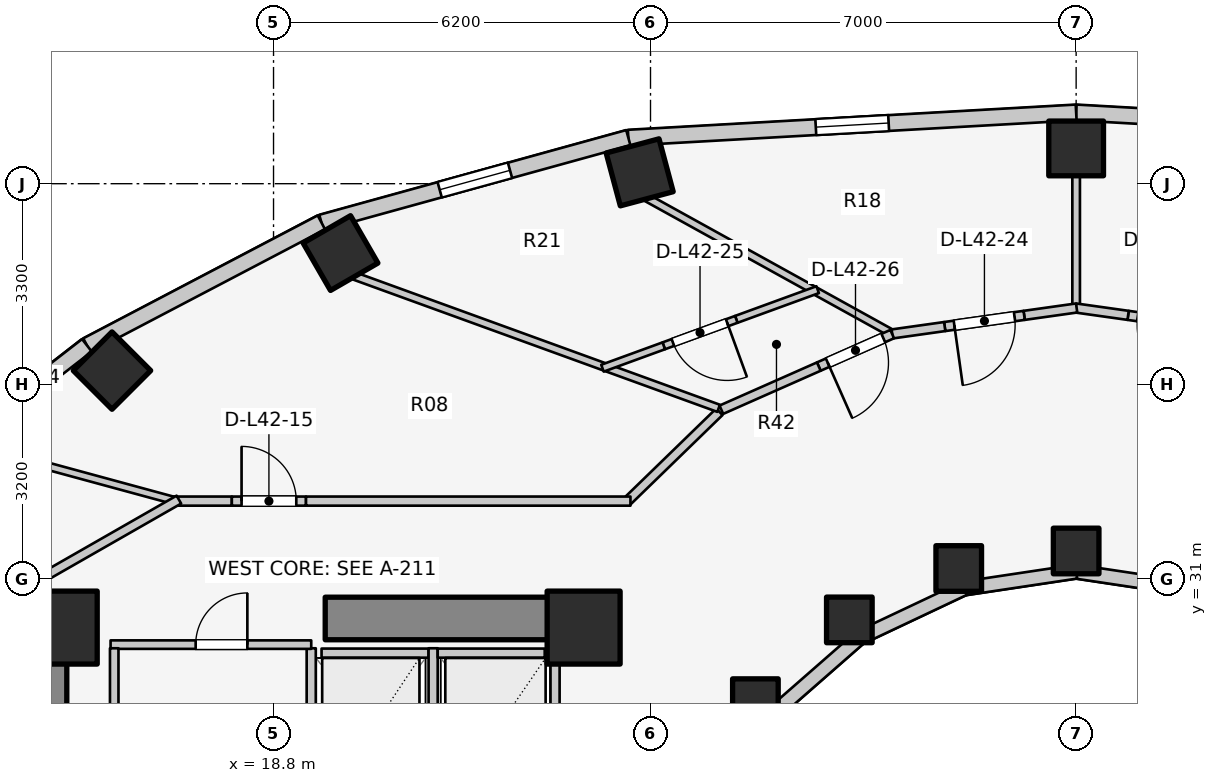
"""IFC4 building model, lengths in metres.
Left out: names, types, materials, properties, quantities, classifications, styles, units other than length and angle.
Written with IfcOpenShell. Run it as: python <this file> out.ifc"""

import sys

from ifc_helpers import new_model, si_unit, direction, frame, frame_2d, origin, origin_2d, place, context, subcontext, project, spatial, rectangle, extrude, element, fill, save


model = new_model("IFC4")
c1 = context("Model", 3, precision=1e-05, world=origin(), true_north=direction((0.0, 1.0)))
c2 = subcontext(c1, "Body", "Model", "MODEL_VIEW")
j1 = project(units=[si_unit("LENGTHUNIT", "METRE"), si_unit("PLANEANGLEUNIT", "RADIAN")], contexts=[c1])
p1 = place(None, origin())
s1 = spatial("IfcSite", under=j1, at=p1, CompositionType="ELEMENT")
p2 = place(p1, origin())
s2 = spatial("IfcBuilding", under=s1, at=p2, CompositionType="ELEMENT")
p3 = place(p2, frame((0.0, 0.0, 140.5)))
s3 = spatial("IfcBuildingStorey", under=s2, at=p3, CompositionType="ELEMENT", Elevation=140.5)
p4 = place(p3, frame((15.05, 17.05, 0.0), z_axis=(0.0, 0.0, 1.0), x_axis=(0.0, 1.0, 0.0)))
e1 = element("IfcWall", 1, at=p4, inside=s3, PredefinedType="SHEAR", context=c2, shape_type="SweptSolid", body=[
    extrude(rectangle(XDim=12.8, YDim=0.7, at=frame_2d((6.4, 0.0))), origin(), (0.0, 0.0, 1.0), 3.1),
])
p5 = place(p3, frame((19.65, 30.35, 0.0), z_axis=(0.0, 0.0, 1.0), x_axis=(1.0, 0.0, 0.0)))
e2 = element("IfcWall", 2, at=p5, inside=s3, PredefinedType="SHEAR", context=c2, shape_type="SweptSolid", body=[
    extrude(rectangle(XDim=4.5, YDim=0.7, at=frame_2d((2.25, 0.0))), origin(), (0.0, 0.0, 1.0), 3.1),
])
for number, where, z_axis, x_axis in (
    (3, (23.9, 30.2, 0.0), (0.0, 0.0, 1.0), (1.0, 0.0, 0.0)),
    (4, (15.3, 30.2, 0.0), (0.0, 0.0, 1.0), (1.0, 0.0, 0.0)),
):
    element("IfcColumn", number, at=place(p3, frame(where, z_axis=z_axis, x_axis=x_axis)), inside=s3, PredefinedType="COLUMN", context=c2, shape_type="SweptSolid", body=[
        extrude(rectangle(XDim=1.2, YDim=1.2, at=origin_2d()), origin(), (0.0, 0.0, 1.0), 3.1),
    ])
p6 = place(p3, frame((32.0, 31.46, 0.0), z_axis=(0.0, 0.0, 1.0), x_axis=(1.0, 0.0, 0.0)))
e5 = element("IfcColumn", 5, at=p6, inside=s3, PredefinedType="COLUMN", context=c2, shape_type="SweptSolid", body=[
    extrude(rectangle(XDim=0.75, YDim=0.75, at=origin_2d()), origin(), (0.0, 0.0, 1.0), 3.1),
])
p7 = place(p3, frame((32.0, 38.08, 0.0), z_axis=(0.0, 0.0, 1.0), x_axis=(0.0, 1.0, 0.0)))
e6 = element("IfcColumn", 6, at=p7, inside=s3, PredefinedType="COLUMN", context=c2, shape_type="SweptSolid", body=[
    extrude(rectangle(XDim=0.9, YDim=0.9, at=origin_2d()), origin(), (0.0, 0.0, 1.0), 3.1),
])
p8 = place(p3, frame((30.069, 31.172, 0.0), z_axis=(0.0, 0.0, 1.0), x_axis=(1.0, 0.0, 0.0)))
e7 = element("IfcColumn", 7, at=p8, inside=s3, PredefinedType="COLUMN", context=c2, shape_type="SweptSolid", body=[
    extrude(rectangle(XDim=0.75, YDim=0.75, at=origin_2d()), origin(), (0.0, 0.0, 1.0), 3.1),
])
p9 = place(p3, frame((24.822, 37.687, 0.0), z_axis=(0.0, 0.0, 1.0), x_axis=(-0.258819045103, 0.965925826289, 0.0)))
e8 = element("IfcColumn", 8, at=p9, inside=s3, PredefinedType="COLUMN", context=c2, shape_type="SweptSolid", body=[
    extrude(rectangle(XDim=0.9, YDim=0.9, at=origin_2d()), origin(), (0.0, 0.0, 1.0), 3.1),
])
p10 = place(p3, frame((28.27, 30.327, 0.0), z_axis=(0.0, 0.0, 1.0), x_axis=(1.0, 0.0, 0.0)))
e9 = element("IfcColumn", 9, at=p10, inside=s3, PredefinedType="COLUMN", context=c2, shape_type="SweptSolid", body=[
    extrude(rectangle(XDim=0.75, YDim=0.75, at=origin_2d()), origin(), (0.0, 0.0, 1.0), 3.1),
])
p11 = place(p3, frame((19.902, 36.359, 0.0), z_axis=(0.0, 0.0, 1.0), x_axis=(-0.5, 0.866025403784, 0.0)))
e10 = element("IfcColumn", 10, at=p11, inside=s3, PredefinedType="COLUMN", context=c2, shape_type="SweptSolid", body=[
    extrude(rectangle(XDim=0.9, YDim=0.9, at=origin_2d()), origin(), (0.0, 0.0, 1.0), 3.1),
])
p12 = place(p3, frame((26.725, 28.982, 0.0), z_axis=(0.0, 0.0, 1.0), x_axis=(1.0, 0.0, 0.0)))
e11 = element("IfcColumn", 11, at=p12, inside=s3, PredefinedType="COLUMN", context=c2, shape_type="SweptSolid", body=[
    extrude(rectangle(XDim=0.75, YDim=0.75, at=origin_2d()), origin(), (0.0, 0.0, 1.0), 3.1),
])
p13 = place(p3, frame((16.143, 34.427, 0.0), z_axis=(0.0, 0.0, 1.0), x_axis=(-0.707106781187, 0.707106781187, 0.0)))
e12 = element("IfcColumn", 12, at=p13, inside=s3, PredefinedType="COLUMN", context=c2, shape_type="SweptSolid", body=[
    extrude(rectangle(XDim=0.9, YDim=0.9, at=origin_2d()), origin(), (0.0, 0.0, 1.0), 3.1),
])
for number, where, z_axis, x_axis in (
    (13, (33.843, 30.843, 0.0), (0.0, 0.0, 1.0), (-0.989, 0.149, 0.0)),
    (14, (32.0, 31.12, 0.0), (0.0, 0.0, 1.0), (-0.989, -0.149, 0.0)),
):
    element("IfcWall", number, at=place(p3, frame(where, z_axis=z_axis, x_axis=x_axis)), inside=s3, PredefinedType="STANDARD", context=c2, shape_type="SweptSolid", body=[
        extrude(rectangle(XDim=1.864, YDim=0.23, at=frame_2d((0.932, 0.0))), origin(), (0.0, 0.0, 1.0), 1.22),
    ])
p14 = place(p3, frame((30.157, 30.843, 0.0), z_axis=(0.0, 0.0, 1.0), x_axis=(-0.904179699603, -0.427152280606, 0.0)))
e15 = element("IfcWall", 15, at=p14, inside=s3, PredefinedType="STANDARD", context=c2, shape_type="SweptSolid", body=[
    extrude(rectangle(XDim=1.899, YDim=0.23, at=frame_2d((0.95, 0.0))), origin(), (0.0, 0.0, 1.0), 1.22),
])
p15 = place(p3, frame((28.44, 30.032, 0.0), z_axis=(0.0, 0.0, 1.0), x_axis=(-0.752576694707, -0.658504607869, 0.0)))
e16 = element("IfcWall", 16, at=p15, inside=s3, PredefinedType="STANDARD", context=c2, shape_type="SweptSolid", body=[
    extrude(rectangle(XDim=1.959, YDim=0.23, at=frame_2d((0.98, 0.0))), origin(), (0.0, 0.0, 1.0), 1.22),
])
p16 = place(p3, frame((39.365, 38.257, 0.0), z_axis=(0.0, 0.0, 1.0), x_axis=(-0.998417906562, 0.056228852534, 0.0)))
e17 = element("IfcWall", 17, at=p16, inside=s3, PredefinedType="STANDARD", context=c2, shape_type="SweptSolid", body=[
    extrude(rectangle(XDim=7.377, YDim=0.26, at=frame_2d((3.688, 0.0))), origin(), (0.0, 0.0, 1.0), 1.22),
])
p17 = place(p16, frame((3.088, 0.0, 0.15)))
e18 = element("IfcOpeningElement", 18, at=p17, cuts=e17, PredefinedType="OPENING", context=c2, shape_type="SweptSolid", body=[
    extrude(rectangle(XDim=1.2, YDim=0.9, at=frame_2d((0.6, 0.45))), frame((0.0, 0.14, 0.0), z_axis=(0.0, -1.0, 0.0), x_axis=(1.0, 0.0, 0.0)), (0.0, 0.0, 1.0), 0.28),
])
p18 = place(p3, frame((32.0, 38.671, 0.0), z_axis=(0.0, 0.0, 1.0), x_axis=(-0.998417906562, -0.056228852534, 0.0)))
e19 = element("IfcWall", 19, at=p18, inside=s3, PredefinedType="STANDARD", context=c2, shape_type="SweptSolid", body=[
    extrude(rectangle(XDim=7.377, YDim=0.26, at=frame_2d((3.688, 0.0))), origin(), (0.0, 0.0, 1.0), 1.22),
])
p19 = place(p18, frame((3.088, 0.0, 0.15)))
e20 = element("IfcOpeningElement", 20, at=p19, cuts=e19, PredefinedType="OPENING", context=c2, shape_type="SweptSolid", body=[
    extrude(rectangle(XDim=1.2, YDim=0.9, at=frame_2d((0.6, 0.45))), frame((0.0, 0.14, 0.0), z_axis=(0.0, -1.0, 0.0), x_axis=(1.0, 0.0, 0.0)), (0.0, 0.0, 1.0), 0.28),
])
p20 = place(p3, frame((24.635, 38.257, 0.0), z_axis=(0.0, 0.0, 1.0), x_axis=(-0.963953455704, -0.26607092144, 0.0)))
e21 = element("IfcWall", 21, at=p20, inside=s3, PredefinedType="STANDARD", context=c2, shape_type="SweptSolid", body=[
    extrude(rectangle(XDim=5.237, YDim=0.26, at=frame_2d((2.618, 0.0))), origin(), (0.0, 0.0, 1.0), 1.22),
])
p21 = place(p20, frame((2.018, 0.0, 0.15)))
e22 = element("IfcOpeningElement", 22, at=p21, cuts=e21, PredefinedType="OPENING", context=c2, shape_type="SweptSolid", body=[
    extrude(rectangle(XDim=1.2, YDim=0.9, at=frame_2d((0.6, 0.45))), frame((0.0, 0.14, 0.0), z_axis=(0.0, -1.0, 0.0), x_axis=(1.0, 0.0, 0.0)), (0.0, 0.0, 1.0), 0.28),
])
p22 = place(p3, frame((19.587, 36.863, 0.0), z_axis=(0.0, 0.0, 1.0), x_axis=(-0.885660265226, -0.464333818065, 0.0)))
e23 = element("IfcWall", 23, at=p22, inside=s3, PredefinedType="STANDARD", context=c2, shape_type="SweptSolid", body=[
    extrude(rectangle(XDim=4.354, YDim=0.26, at=frame_2d((2.177, 0.0))), origin(), (0.0, 0.0, 1.0), 1.22),
])
p23 = place(p3, frame((15.731, 34.842, 0.0), z_axis=(0.0, 0.0, 1.0), x_axis=(-0.790185650662, -0.612867552973, 0.0)))
e24 = element("IfcWall", 24, at=p23, inside=s3, PredefinedType="STANDARD", context=c2, shape_type="SweptSolid", body=[
    extrude(rectangle(XDim=4.239, YDim=0.26, at=frame_2d((2.12, 0.0))), origin(), (0.0, 0.0, 1.0), 1.22),
])
p24 = place(p23, frame((0.731, 0.0, 0.15)))
e25 = element("IfcOpeningElement", 25, at=p24, cuts=e24, PredefinedType="OPENING", context=c2, shape_type="SweptSolid", body=[
    extrude(rectangle(XDim=1.2, YDim=0.9, at=frame_2d((0.6, 0.45))), frame((0.0, 0.14, 0.0), z_axis=(0.0, -1.0, 0.0), x_axis=(1.0, 0.0, 0.0)), (0.0, 0.0, 1.0), 0.28),
])
p25 = place(p3, frame((19.59, 29.78, 0.0), z_axis=(0.0, 0.0, 1.0), x_axis=(1.0, 0.0, 0.0)))
e26 = element("IfcWall", 26, at=p25, inside=s3, PredefinedType="SOLIDWALL", context=c2, shape_type="SweptSolid", body=[
    extrude(rectangle(XDim=1.76, YDim=0.15, at=frame_2d((0.88, 0.0))), origin(), (0.0, 0.0, 1.0), 2.575),
])
for number, where, z_axis, x_axis in (
    (27, (19.42, 27.14, 0.0), (0.0, 0.0, 1.0), (0.0, 1.0, 0.0)),
    (28, (21.425, 27.14, 0.0), (0.0, 0.0, 1.0), (0.0, 1.0, 0.0)),
):
    element("IfcWall", number, at=place(p3, frame(where, z_axis=z_axis, x_axis=x_axis)), inside=s3, PredefinedType="SOLIDWALL", context=c2, shape_type="SweptSolid", body=[
        extrude(rectangle(XDim=2.72, YDim=0.15, at=frame_2d((1.36, 0.0))), origin(), (0.0, 0.0, 1.0), 2.575),
    ])
p26 = place(p3, frame((21.5, 29.78, 0.0), z_axis=(0.0, 0.0, 1.0), x_axis=(1.0, 0.0, 0.0)))
e29 = element("IfcWall", 29, at=p26, inside=s3, PredefinedType="SOLIDWALL", context=c2, shape_type="SweptSolid", body=[
    extrude(rectangle(XDim=1.76, YDim=0.15, at=frame_2d((0.88, 0.0))), origin(), (0.0, 0.0, 1.0), 2.575),
])
p27 = place(p3, frame((23.43, 27.14, 0.0), z_axis=(0.0, 0.0, 1.0), x_axis=(0.0, 1.0, 0.0)))
e30 = element("IfcWall", 30, at=p27, inside=s3, PredefinedType="SOLIDWALL", context=c2, shape_type="SweptSolid", body=[
    extrude(rectangle(XDim=2.72, YDim=0.15, at=frame_2d((1.36, 0.0))), origin(), (0.0, 0.0, 1.0), 2.575),
])
p28 = place(p3, frame((16.12, 29.92, 0.0), z_axis=(0.0, 0.0, 1.0), x_axis=(1.0, 0.0, 0.0)))
e31 = element("IfcWall", 31, at=p28, inside=s3, PredefinedType="PLUMBINGWALL", context=c2, shape_type="SweptSolid", body=[
    extrude(rectangle(XDim=3.3, YDim=0.14, at=frame_2d((1.65, 0.0))), origin(), (0.0, 0.0, 1.0), 2.575),
])
p29 = place(p28, frame((1.399, 0.0, 0.0)))
e32 = element("IfcOpeningElement", 32, at=p29, cuts=e31, PredefinedType="OPENING", context=c2, shape_type="SweptSolid", body=[
    extrude(rectangle(XDim=0.85, YDim=2.05, at=frame_2d((0.425, 1.025))), frame((0.0, 0.08, 0.0), z_axis=(0.0, -1.0, 0.0), x_axis=(1.0, 0.0, 0.0)), (0.0, 0.0, 1.0), 0.16),
])
p30 = place(p3, frame((16.18, 25.98, 0.0), z_axis=(0.0, 0.0, 1.0), x_axis=(0.0, 1.0, 0.0)))
e33 = element("IfcWall", 33, at=p30, inside=s3, PredefinedType="PLUMBINGWALL", context=c2, shape_type="SweptSolid", body=[
    extrude(rectangle(XDim=3.88, YDim=0.14, at=frame_2d((1.94, 0.0))), origin(), (0.0, 0.0, 1.0), 2.575),
])
p31 = place(p3, frame((17.248, 32.267, 0.0), z_axis=(0.0, 0.0, 1.0), x_axis=(-0.964996026859, 0.262264500356, 0.0)))
e34 = element("IfcWall", 34, at=p31, inside=s3, PredefinedType="MOVABLE", context=c2, shape_type="SweptSolid", body=[
    extrude(rectangle(XDim=2.204, YDim=0.12, at=frame_2d((1.102, 0.0))), origin(), (0.0, 0.0, 1.0), 1.22),
])
p32 = place(p3, frame((26.133, 33.749, 0.0), z_axis=(0.0, 0.0, 1.0), x_axis=(-0.717419568599, -0.696641344302, 0.0)))
e35 = element("IfcWall", 35, at=p32, inside=s3, PredefinedType="PARTITIONING", context=c2, shape_type="SweptSolid", body=[
    extrude(rectangle(XDim=2.138, YDim=0.15, at=frame_2d((1.069, 0.0))), origin(), (0.0, 0.0, 1.0), 1.22),
])
p33 = place(p3, frame((17.15, 32.28, 0.0), z_axis=(0.0, 0.0, 1.0), x_axis=(1.0, 0.0, 0.0)))
e36 = element("IfcWall", 36, at=p33, inside=s3, PredefinedType="PARTITIONING", context=c2, shape_type="SweptSolid", body=[
    extrude(rectangle(XDim=0.964, YDim=0.15, at=frame_2d((0.482, 0.0))), origin(), (0.0, 0.0, 1.0), 2.575),
])
p34 = place(p3, frame((18.114, 32.28, 0.0), z_axis=(0.0, 0.0, 1.0), x_axis=(1.0, 0.0, 0.0)))
e37 = element("IfcWall", 37, at=p34, inside=s3, PredefinedType="PARTITIONING", context=c2, shape_type="SweptSolid", body=[
    extrude(rectangle(XDim=1.22, YDim=0.15, at=frame_2d((0.61, 0.0))), origin(), (0.0, 0.0, 1.0), 2.16),
])
p35 = place(p34, frame((0.16, 0.0, 0.0)))
e38 = element("IfcOpeningElement", 38, at=p35, cuts=e37, PredefinedType="OPENING", context=c2, shape_type="SweptSolid", body=[
    extrude(rectangle(XDim=0.9, YDim=2.1, at=frame_2d((0.45, 1.05))), frame((0.0, 0.085, 0.0), z_axis=(0.0, -1.0, 0.0), x_axis=(1.0, 0.0, 0.0)), (0.0, 0.0, 1.0), 0.17),
])
p36 = place(p3, frame((19.334, 32.28, 0.0), z_axis=(0.0, 0.0, 1.0), x_axis=(1.0, 0.0, 0.0)))
e39 = element("IfcWall", 39, at=p36, inside=s3, PredefinedType="PARTITIONING", context=c2, shape_type="SweptSolid", body=[
    extrude(rectangle(XDim=5.336, YDim=0.15, at=frame_2d((2.668, 0.0))), origin(), (0.0, 0.0, 1.0), 1.22),
])
p37 = place(p3, frame((17.243, 32.305, 0.0), z_axis=(0.0, 0.0, 1.0), x_axis=(-0.867991349648, -0.496579315857, 0.0)))
e40 = element("IfcWall", 40, at=p37, inside=s3, PredefinedType="PARTITIONING", context=c2, shape_type="SweptSolid", body=[
    extrude(rectangle(XDim=2.567, YDim=0.15, at=frame_2d((1.283, 0.0))), origin(), (0.0, 0.0, 1.0), 1.22),
])
p38 = place(p3, frame((32.0, 35.511, 0.0), z_axis=(0.0, 0.0, 1.0), x_axis=(0.0, 1.0, 0.0)))
e41 = element("IfcWall", 41, at=p38, inside=s3, PredefinedType="PARTITIONING", context=c2, shape_type="SweptSolid", body=[
    extrude(rectangle(XDim=2.139, YDim=0.125, at=frame_2d((1.069, 0.0))), origin(), (0.0, 0.0, 1.0), 1.22),
])
p39 = place(p3, frame((28.935, 35.058, 0.0), z_axis=(0.0, 0.0, 1.0), x_axis=(-0.875077338582, 0.48398311076, 0.0)))
e42 = element("IfcWall", 42, at=p39, inside=s3, PredefinedType="PARTITIONING", context=c2, shape_type="SweptSolid", body=[
    extrude(rectangle(XDim=4.573, YDim=0.125, at=frame_2d((2.287, 0.0))), origin(), (0.0, 0.0, 1.0), 1.22),
])
p40 = place(p3, frame((26.12, 33.806, 0.0), z_axis=(0.0, 0.0, 1.0), x_axis=(-0.939901628116, 0.341445353557, 0.0)))
e43 = element("IfcWall", 43, at=p40, inside=s3, PredefinedType="PARTITIONING", context=c2, shape_type="SweptSolid", body=[
    extrude(rectangle(XDim=6.387, YDim=0.125, at=frame_2d((3.194, 0.0))), origin(), (0.0, 0.0, 1.0), 1.22),
])
p41 = place(p3, frame((34.162, 35.151, 0.0), z_axis=(0.0, 0.0, 1.0), x_axis=(-0.990228663531, 0.139453196171, 0.0)))
e44 = element("IfcWall", 44, at=p41, inside=s3, PredefinedType="PARTITIONING", context=c2, shape_type="SweptSolid", body=[
    extrude(rectangle(XDim=1.32, YDim=0.15, at=frame_2d((0.66, 0.0))), origin(), (0.0, 0.0, 1.0), 2.575),
])
p42 = place(p41, frame((0.16, 0.0, 0.0)))
e45 = element("IfcOpeningElement", 45, at=p42, cuts=e44, PredefinedType="OPENING", context=c2, shape_type="SweptSolid", body=[
    extrude(rectangle(XDim=1.0, YDim=2.1, at=frame_2d((0.5, 1.05))), frame((0.0, 0.085, 0.0), z_axis=(0.0, -1.0, 0.0), x_axis=(1.0, 0.0, 0.0)), (0.0, 0.0, 1.0), 0.17),
])
for number, where, z_axis, x_axis in (
    (46, (32.855, 35.335, 0.0), (0.0, 0.0, 1.0), (-0.99, 0.139, 0.0)),
    (47, (32.008, 35.456, 0.0), (0.0, 0.0, 1.0), (-0.99, -0.139, 0.0)),
):
    element("IfcWall", number, at=place(p3, frame(where, z_axis=z_axis, x_axis=x_axis)), inside=s3, PredefinedType="PARTITIONING", context=c2, shape_type="SweptSolid", body=[
        extrude(rectangle(XDim=0.871, YDim=0.15, at=frame_2d((0.436, 0.0))), origin(), (0.0, 0.0, 1.0), 1.22),
    ])
p43 = place(p3, frame((31.145, 35.335, 0.0), z_axis=(0.0, 0.0, 1.0), x_axis=(-0.990228663531, -0.139453196171, 0.0)))
e48 = element("IfcWall", 48, at=p43, inside=s3, PredefinedType="PARTITIONING", context=c2, shape_type="SweptSolid", body=[
    extrude(rectangle(XDim=1.32, YDim=0.15, at=frame_2d((0.66, 0.0))), origin(), (0.0, 0.0, 1.0), 2.575),
])
p44 = place(p43, frame((0.16, 0.0, 0.0)))
e49 = element("IfcOpeningElement", 49, at=p44, cuts=e48, PredefinedType="OPENING", context=c2, shape_type="SweptSolid", body=[
    extrude(rectangle(XDim=1.0, YDim=2.1, at=frame_2d((0.5, 1.05))), frame((0.0, 0.085, 0.0), z_axis=(0.0, -1.0, 0.0), x_axis=(1.0, 0.0, 0.0)), (0.0, 0.0, 1.0), 0.17),
])
p45 = place(p3, frame((29.838, 35.151, 0.0), z_axis=(0.0, 0.0, 1.0), x_axis=(-0.990255371296, -0.139263418091, 0.0)))
e50 = element("IfcWall", 50, at=p45, inside=s3, PredefinedType="PARTITIONING", context=c2, shape_type="SweptSolid", body=[
    extrude(rectangle(XDim=0.871, YDim=0.15, at=frame_2d((0.436, 0.0))), origin(), (0.0, 0.0, 1.0), 2.575),
])
p46 = place(p3, frame((27.749, 35.757, 0.0), z_axis=(0.0, 0.0, 1.0), x_axis=(-0.939467704653, -0.342637464259, 0.0)))
e51 = element("IfcWall", 51, at=p46, inside=s3, PredefinedType="MOVABLE", context=c2, shape_type="SweptSolid", body=[
    extrude(rectangle(XDim=1.424, YDim=0.12, at=frame_2d((0.712, 0.0))), origin(), (0.0, 0.0, 1.0), 1.22),
])
p47 = place(p3, frame((26.411, 35.269, 0.0), z_axis=(0.0, 0.0, 1.0), x_axis=(-0.939428071916, -0.34274611259, 0.0)))
e52 = element("IfcWall", 52, at=p47, inside=s3, PredefinedType="MOVABLE", context=c2, shape_type="SweptSolid", body=[
    extrude(rectangle(XDim=1.27, YDim=0.12, at=frame_2d((0.635, 0.0))), origin(), (0.0, 0.0, 1.0), 2.16),
])
p48 = place(p47, frame((0.16, 0.0, 0.0)))
e53 = element("IfcOpeningElement", 53, at=p48, cuts=e52, PredefinedType="OPENING", context=c2, shape_type="SweptSolid", body=[
    extrude(rectangle(XDim=0.95, YDim=2.1, at=frame_2d((0.475, 1.05))), frame((0.0, 0.07, 0.0), z_axis=(0.0, -1.0, 0.0), x_axis=(1.0, 0.0, 0.0)), (0.0, 0.0, 1.0), 0.14),
])
p49 = place(p3, frame((25.218, 34.834, 0.0), z_axis=(0.0, 0.0, 1.0), x_axis=(-0.939387563121, -0.342857122214, 0.0)))
e54 = element("IfcWall", 54, at=p49, inside=s3, PredefinedType="MOVABLE", context=c2, shape_type="SweptSolid", body=[
    extrude(rectangle(XDim=1.073, YDim=0.12, at=frame_2d((0.537, 0.0))), origin(), (0.0, 0.0, 1.0), 2.575),
])
p50 = place(p3, frame((28.975, 35.027, 0.0), z_axis=(0.0, 0.0, 1.0), x_axis=(-0.914382646268, -0.404851054345, 0.0)))
e55 = element("IfcWall", 55, at=p50, inside=s3, PredefinedType="PARTITIONING", context=c2, shape_type="SweptSolid", body=[
    extrude(rectangle(XDim=1.32, YDim=0.15, at=frame_2d((0.66, 0.0))), origin(), (0.0, 0.0, 1.0), 2.16),
])
p51 = place(p50, frame((0.16, 0.0, 0.0)))
e56 = element("IfcOpeningElement", 56, at=p51, cuts=e55, PredefinedType="OPENING", context=c2, shape_type="SweptSolid", body=[
    extrude(rectangle(XDim=1.0, YDim=2.1, at=frame_2d((0.5, 1.05))), frame((0.0, 0.085, 0.0), z_axis=(0.0, -1.0, 0.0), x_axis=(1.0, 0.0, 0.0)), (0.0, 0.0, 1.0), 0.17),
])
p52 = place(p3, frame((27.768, 34.492, 0.0), z_axis=(0.0, 0.0, 1.0), x_axis=(-0.91447091359, -0.404651638077, 0.0)))
e57 = element("IfcWall", 57, at=p52, inside=s3, PredefinedType="PARTITIONING", context=c2, shape_type="SweptSolid", body=[
    extrude(rectangle(XDim=1.753, YDim=0.15, at=frame_2d((0.876, 0.0))), origin(), (0.0, 0.0, 1.0), 1.22),
])
p53 = place(p19, origin())
e58 = element("IfcWindow", 58, at=p53, inside=s3, PartitioningType="SINGLE_PANEL", PredefinedType="WINDOW", context=c2, shape_type="SweptSolid", body=[
    extrude(rectangle(XDim=1.2, YDim=0.9, at=frame_2d((0.6, 0.45))), frame((0.0, 0.03, 0.0), z_axis=(0.0, -1.0, 0.0), x_axis=(1.0, 0.0, 0.0)), (0.0, 0.0, 1.0), 0.06),
])
fill(e20, e58)
p54 = place(p21, origin())
e59 = element("IfcWindow", 59, at=p54, inside=s3, PartitioningType="SINGLE_PANEL", PredefinedType="WINDOW", context=c2, shape_type="SweptSolid", body=[
    extrude(rectangle(XDim=1.2, YDim=0.9, at=frame_2d((0.6, 0.45))), frame((0.0, 0.03, 0.0), z_axis=(0.0, -1.0, 0.0), x_axis=(1.0, 0.0, 0.0)), (0.0, 0.0, 1.0), 0.06),
])
fill(e22, e59)
p55 = place(p24, origin())
e60 = element("IfcWindow", 60, at=p55, inside=s3, PartitioningType="SINGLE_PANEL", PredefinedType="WINDOW", context=c2, shape_type="SweptSolid", body=[
    extrude(rectangle(XDim=1.2, YDim=0.9, at=frame_2d((0.6, 0.45))), frame((0.0, 0.03, 0.0), z_axis=(0.0, -1.0, 0.0), x_axis=(1.0, 0.0, 0.0)), (0.0, 0.0, 1.0), 0.06),
])
fill(e25, e60)
p56 = place(p29, origin())
e61 = element("IfcDoor", 61, at=p56, inside=s3, OperationType="SINGLE_SWING_RIGHT", PredefinedType="DOOR", context=c2, shape_type="SweptSolid", body=[
    extrude(rectangle(XDim=0.85, YDim=2.05, at=frame_2d((0.425, 1.025))), frame((0.0, 0.025, 0.0), z_axis=(0.0, -1.0, 0.0), x_axis=(1.0, 0.0, 0.0)), (0.0, 0.0, 1.0), 0.05),
])
fill(e32, e61)
p57 = place(p35, origin())
e62 = element("IfcDoor", 62, at=p57, inside=s3, OperationType="SINGLE_SWING_LEFT", PredefinedType="DOOR", context=c2, shape_type="SweptSolid", body=[
    extrude(rectangle(XDim=0.9, YDim=2.1, at=frame_2d((0.45, 1.05))), frame((0.0, 0.025, 0.0), z_axis=(0.0, -1.0, 0.0), x_axis=(1.0, 0.0, 0.0)), (0.0, 0.0, 1.0), 0.05),
])
fill(e38, e62)
p58 = place(p44, origin())
e63 = element("IfcDoor", 63, at=p58, inside=s3, OperationType="SINGLE_SWING_RIGHT", PredefinedType="DOOR", context=c2, shape_type="SweptSolid", body=[
    extrude(rectangle(XDim=1.0, YDim=2.1, at=frame_2d((0.5, 1.05))), frame((0.0, 0.025, 0.0), z_axis=(0.0, -1.0, 0.0), x_axis=(1.0, 0.0, 0.0)), (0.0, 0.0, 1.0), 0.05),
])
fill(e49, e63)
p59 = place(p48, origin())
e64 = element("IfcDoor", 64, at=p59, inside=s3, OperationType="SINGLE_SWING_LEFT", PredefinedType="DOOR", context=c2, shape_type="SweptSolid", body=[
    extrude(rectangle(XDim=0.95, YDim=2.1, at=frame_2d((0.475, 1.05))), frame((0.0, 0.025, 0.0), z_axis=(0.0, -1.0, 0.0), x_axis=(1.0, 0.0, 0.0)), (0.0, 0.0, 1.0), 0.05),
])
fill(e53, e64)
p60 = place(p51, origin())
e65 = element("IfcDoor", 65, at=p60, inside=s3, OperationType="SINGLE_SWING_RIGHT", PredefinedType="DOOR", context=c2, shape_type="SweptSolid", body=[
    extrude(rectangle(XDim=1.0, YDim=2.1, at=frame_2d((0.5, 1.05))), frame((0.0, 0.025, 0.0), z_axis=(0.0, -1.0, 0.0), x_axis=(1.0, 0.0, 0.0)), (0.0, 0.0, 1.0), 0.05),
])
fill(e56, e65)
save(model, sys.argv[1])
